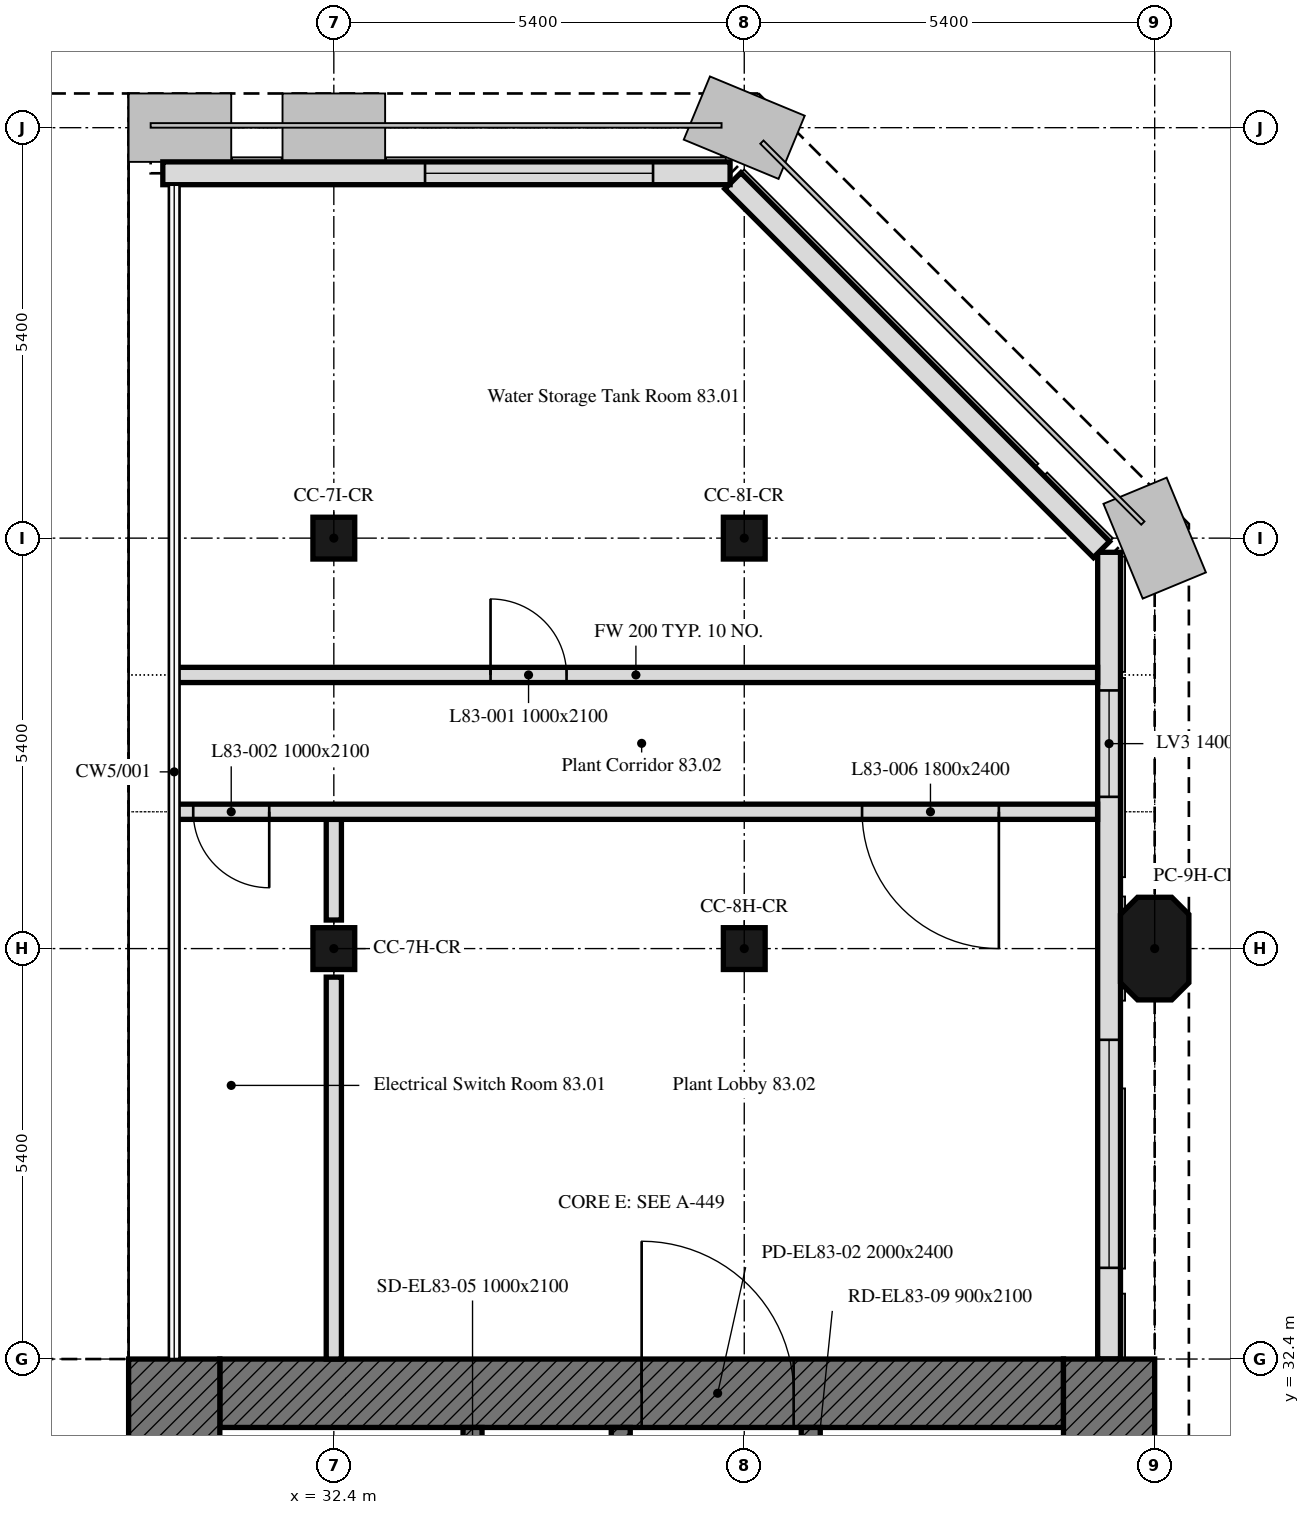
"""IFC4 building model, lengths in metres.
Left out: names, types, materials, properties, quantities, classifications, styles, units other than length and angle.
Written with IfcOpenShell. Run it as: python <this file> out.ifc"""

import sys

from ifc_helpers import new_model, si_unit, direction, frame, frame_2d, origin, origin_2d, place, context, subcontext, project, spatial, polyline, rectangle, outline, extrude, element, fill, save


model = new_model("IFC4")
c1 = context("Model", 3, precision=1e-05, world=origin(), true_north=direction((0.0, 1.0)))
c2 = subcontext(c1, "Body", "Model", "MODEL_VIEW")
j1 = project(units=[si_unit("LENGTHUNIT", "METRE"), si_unit("PLANEANGLEUNIT", "RADIAN")], contexts=[c1])
p1 = place(None, origin())
s1 = spatial("IfcSite", under=j1, at=p1, CompositionType="ELEMENT")
p2 = place(p1, origin())
s2 = spatial("IfcBuilding", under=s1, at=p2, CompositionType="ELEMENT")
p3 = place(p2, frame((0.0, 0.0, 335.2)))
s3 = spatial("IfcBuildingStorey", under=s2, at=p3, CompositionType="ELEMENT", Elevation=335.2)
for number, where, z_axis, x_axis in (
    (1, (32.4, 37.8, 0.0), (0.0, 0.0, 1.0), (1.0, 0.0, 0.0)),
    (2, (37.8, 37.8, 0.0), (0.0, 0.0, 1.0), (1.0, 0.0, 0.0)),
):
    element("IfcColumn", number, at=place(p3, frame(where, z_axis=z_axis, x_axis=x_axis)), inside=s3, PredefinedType="COLUMN", context=c2, shape_type="SweptSolid", body=[
        extrude(rectangle(XDim=0.55, YDim=0.55, at=origin_2d()), origin(), (0.0, 0.0, 1.0), 2.7),
    ])
p4 = place(p3, frame((43.2, 37.8, 0.0), z_axis=(0.0, 0.0, 1.0), x_axis=(0.0, 1.0, 0.0)))
e3 = element("IfcColumn", 3, at=p4, inside=s3, PredefinedType="COLUMN", context=c2, shape_type="SweptSolid", body=[
    extrude(outline(polyline([(-0.45, -0.45), (0.45, -0.45), (0.675, -0.225), (0.675, 0.225), (0.45, 0.45), (-0.45, 0.45), (-0.675, 0.225), (-0.675, -0.225), (-0.45, -0.45)])), origin(), (0.0, 0.0, 1.0), 2.7),
])
for number, where, z_axis, x_axis in (
    (4, (32.4, 43.2, 0.0), (0.0, 0.0, 1.0), (1.0, 0.0, 0.0)),
    (5, (37.8, 43.2, 0.0), (0.0, 0.0, 1.0), (1.0, 0.0, 0.0)),
):
    element("IfcColumn", number, at=place(p3, frame(where, z_axis=z_axis, x_axis=x_axis)), inside=s3, PredefinedType="COLUMN", context=c2, shape_type="SweptSolid", body=[
        extrude(rectangle(XDim=0.55, YDim=0.55, at=origin_2d()), origin(), (0.0, 0.0, 1.0), 2.7),
    ])
p5 = place(p3, frame((42.6, 32.4, 0.0), z_axis=(0.0, 0.0, 1.0), x_axis=(0.0, 1.0, 0.0)))
e6 = element("IfcWall", 6, at=p5, inside=s3, PredefinedType="SOLIDWALL", context=c2, shape_type="SweptSolid", body=[
    extrude(outline(polyline([(0.0, 0.0), (10.614, 0.0), (10.614, 8.433), (10.024, 8.433), (9.434, 8.433), (8.845, 8.433), (8.255, 8.433), (7.665, 8.433), (7.076, 8.433), (6.486, 8.433), (5.896, 8.433), (5.307, 8.433), (4.717, 8.433), (4.127, 8.433), (3.538, 8.433), (2.948, 8.433), (2.359, 8.433), (1.769, 8.433), (1.179, 8.433), (0.59, 8.433), (0.0, 8.433), (0.0, 0.0)])), frame((0.0, 0.15, 0.0), z_axis=(0.0, -1.0, 0.0), x_axis=(1.0, 0.0, 0.0)), (0.0, 0.0, 1.0), 0.3),
])
p6 = place(p5, frame((1.2, 0.0, 0.6)))
e7 = element("IfcOpeningElement", 7, at=p6, cuts=e6, PredefinedType="OPENING", context=c2, shape_type="SweptSolid", body=[
    extrude(rectangle(XDim=3.0, YDim=1.8, at=frame_2d((1.5, 0.9))), frame((0.0, 0.16, 0.0), z_axis=(0.0, -1.0, 0.0), x_axis=(1.0, 0.0, 0.0)), (0.0, 0.0, 1.0), 0.32),
])
p7 = place(p5, frame((7.396, 0.0, 0.6)))
e8 = element("IfcOpeningElement", 8, at=p7, cuts=e6, PredefinedType="OPENING", context=c2, shape_type="SweptSolid", body=[
    extrude(rectangle(XDim=1.4, YDim=1.8, at=frame_2d((0.7, 0.9))), frame((0.0, 0.16, 0.0), z_axis=(0.0, -1.0, 0.0), x_axis=(1.0, 0.0, 0.0)), (0.0, 0.0, 1.0), 0.32),
])
p8 = place(p3, frame((42.501, 43.051, 0.0), z_axis=(0.0, 0.0, 1.0), x_axis=(-0.707106781187, 0.707106781187, 0.0)))
e9 = element("IfcWall", 9, at=p8, inside=s3, PredefinedType="SOLIDWALL", context=c2, shape_type="SweptSolid", body=[
    extrude(outline(polyline([(0.0, 0.0), (6.86, 0.0), (6.86, 6.234), (6.288, 6.413), (5.716, 6.593), (5.145, 6.772), (4.573, 6.952), (4.001, 7.132), (3.43, 7.312), (2.858, 7.491), (2.287, 7.671), (1.715, 7.85), (1.143, 8.03), (0.572, 8.21), (0.0, 8.389), (0.0, 0.0)])), frame((0.0, 0.15, 0.0), z_axis=(0.0, -1.0, 0.0), x_axis=(1.0, 0.0, 0.0)), (0.0, 0.0, 1.0), 0.3),
])
p9 = place(p3, frame((37.614, 48.0, 0.0), z_axis=(0.0, 0.0, 1.0), x_axis=(-1.0, 0.0, 0.0)))
e10 = element("IfcWall", 10, at=p9, inside=s3, PredefinedType="SOLIDWALL", context=c2, shape_type="SweptSolid", body=[
    extrude(outline(polyline([(0.0, 0.0), (7.464, 0.0), (7.464, 2.9), (6.889, 3.155), (6.315, 3.41), (5.741, 3.666), (5.167, 3.921), (4.593, 4.176), (4.019, 4.431), (3.445, 4.686), (2.871, 4.941), (2.296, 5.197), (1.722, 5.452), (1.148, 5.707), (0.574, 5.962), (0.0, 6.217), (0.0, 0.0)])), frame((0.0, 0.15, 0.0), z_axis=(0.0, -1.0, 0.0), x_axis=(1.0, 0.0, 0.0)), (0.0, 0.0, 1.0), 0.3),
])
p10 = place(p9, frame((1.014, 0.0, 0.6)))
e11 = element("IfcOpeningElement", 11, at=p10, cuts=e10, PredefinedType="OPENING", context=c2, shape_type="SweptSolid", body=[
    extrude(rectangle(XDim=3.0, YDim=1.8, at=frame_2d((1.5, 0.9))), frame((0.0, 0.16, 0.0), z_axis=(0.0, -1.0, 0.0), x_axis=(1.0, 0.0, 0.0)), (0.0, 0.0, 1.0), 0.32),
])
p11 = place(p3, frame((30.9, 31.95, 0.0), z_axis=(0.0, 0.0, 1.0), x_axis=(1.0, 0.0, 0.0)))
e12 = element("IfcWall", 12, at=p11, inside=s3, PredefinedType="SOLIDWALL", context=c2, shape_type="SweptSolid", body=[
    extrude(outline(polyline([(0.0, 0.0), (11.1, 0.0), (11.1, 8.167), (0.0, 3.233), (0.0, 0.0)])), frame((0.0, 0.45, 0.0), z_axis=(0.0, -1.0, 0.0), x_axis=(1.0, 0.0, 0.0)), (0.0, 0.0, 1.0), 0.9),
])
p12 = place(p11, frame((5.55, 0.0, 0.0)))
e13 = element("IfcOpeningElement", 13, at=p12, cuts=e12, PredefinedType="OPENING", context=c2, shape_type="SweptSolid", body=[
    extrude(rectangle(XDim=2.0, YDim=2.4, at=frame_2d((1.0, 1.2))), frame((0.0, 0.45, 0.0), z_axis=(0.0, -1.0, 0.0), x_axis=(1.0, 0.0, 0.0)), (0.0, 0.0, 1.0), 0.9),
])
p13 = place(p3, frame((42.6, 32.4, 0.0), z_axis=(0.0, 0.0, 1.0), x_axis=(0.0, -1.0, 0.0)))
e14 = element("IfcWall", 14, at=p13, inside=s3, PredefinedType="SOLIDWALL", context=c2, shape_type="SweptSolid", body=[
    extrude(rectangle(XDim=16.2, YDim=1.2, at=frame_2d((8.1, 0.0))), origin(), (0.0, 0.0, 1.0), 8.433),
])
p14 = place(p3, frame((30.3, 16.2, 0.0), z_axis=(0.0, 0.0, 1.0), x_axis=(0.0, 1.0, 0.0)))
e15 = element("IfcWall", 15, at=p14, inside=s3, PredefinedType="SOLIDWALL", context=c2, shape_type="SweptSolid", body=[
    extrude(rectangle(XDim=16.2, YDim=1.2, at=frame_2d((8.1, 0.0))), origin(), (0.0, 0.0, 1.0), 2.967),
])
p15 = place(p3, frame((38.675, 17.1, 0.0), z_axis=(0.0, 0.0, 1.0), x_axis=(0.0, 1.0, 0.0)))
e16 = element("IfcWall", 16, at=p15, inside=s3, PredefinedType="SOLIDWALL", context=c2, shape_type="SweptSolid", body=[
    extrude(rectangle(XDim=14.4, YDim=0.25, at=frame_2d((7.2, 0.0))), origin(), (0.0, 0.0, 1.0), 6.689),
])
p16 = place(p15, frame((4.6, 0.0, 0.0)))
e17 = element("IfcOpeningElement", 17, at=p16, cuts=e16, PredefinedType="OPENING", context=c2, shape_type="SweptSolid", body=[
    extrude(rectangle(XDim=1.0, YDim=2.1, at=frame_2d((0.5, 1.05))), frame((0.0, 0.125, 0.0), z_axis=(0.0, -1.0, 0.0), x_axis=(1.0, 0.0, 0.0)), (0.0, 0.0, 1.0), 0.25),
])
p17 = place(p15, frame((7.062, 0.0, 0.0)))
e18 = element("IfcOpeningElement", 18, at=p17, cuts=e16, PredefinedType="OPENING", context=c2, shape_type="SweptSolid", body=[
    extrude(rectangle(XDim=1.2, YDim=2.1, at=frame_2d((0.6, 1.05))), frame((0.0, 0.125, 0.0), z_axis=(0.0, -1.0, 0.0), x_axis=(1.0, 0.0, 0.0)), (0.0, 0.0, 1.0), 0.25),
])
p18 = place(p15, frame((10.106, 0.0, 0.0)))
e19 = element("IfcOpeningElement", 19, at=p18, cuts=e16, PredefinedType="OPENING", context=c2, shape_type="SweptSolid", body=[
    extrude(rectangle(XDim=0.9, YDim=2.1, at=frame_2d((0.45, 1.05))), frame((0.0, 0.125, 0.0), z_axis=(0.0, -1.0, 0.0), x_axis=(1.0, 0.0, 0.0)), (0.0, 0.0, 1.0), 0.25),
])
p19 = place(p15, frame((12.719, 0.0, 0.0)))
e20 = element("IfcOpeningElement", 20, at=p19, cuts=e16, PredefinedType="OPENING", context=c2, shape_type="SweptSolid", body=[
    extrude(rectangle(XDim=0.9, YDim=2.1, at=frame_2d((0.45, 1.05))), frame((0.0, 0.125, 0.0), z_axis=(0.0, -1.0, 0.0), x_axis=(1.0, 0.0, 0.0)), (0.0, 0.0, 1.0), 0.25),
])
p20 = place(p3, frame((34.225, 17.1, 0.0), z_axis=(0.0, 0.0, 1.0), x_axis=(0.0, 1.0, 0.0)))
e21 = element("IfcWall", 21, at=p20, inside=s3, PredefinedType="SOLIDWALL", context=c2, shape_type="SweptSolid", body=[
    extrude(rectangle(XDim=14.4, YDim=0.25, at=frame_2d((7.2, 0.0))), origin(), (0.0, 0.0, 1.0), 4.711),
])
p21 = place(p20, frame((13.15, 0.0, 0.0)))
e22 = element("IfcOpeningElement", 22, at=p21, cuts=e21, PredefinedType="OPENING", context=c2, shape_type="SweptSolid", body=[
    extrude(rectangle(XDim=1.0, YDim=2.1, at=frame_2d((0.5, 1.05))), frame((0.0, 0.125, 0.0), z_axis=(0.0, -1.0, 0.0), x_axis=(1.0, 0.0, 0.0)), (0.0, 0.0, 1.0), 0.25),
])
p22 = place(p20, frame((0.24, 0.0, 0.0)))
e23 = element("IfcOpeningElement", 23, at=p22, cuts=e21, PredefinedType="OPENING", context=c2, shape_type="SweptSolid", body=[
    extrude(rectangle(XDim=0.9, YDim=2.1, at=frame_2d((0.45, 1.05))), frame((0.0, 0.125, 0.0), z_axis=(0.0, -1.0, 0.0), x_axis=(1.0, 0.0, 0.0)), (0.0, 0.0, 1.0), 0.25),
])
p23 = place(p20, frame((2.74, 0.0, 0.0)))
e24 = element("IfcOpeningElement", 24, at=p23, cuts=e21, PredefinedType="OPENING", context=c2, shape_type="SweptSolid", body=[
    extrude(rectangle(XDim=0.9, YDim=2.1, at=frame_2d((0.45, 1.05))), frame((0.0, 0.125, 0.0), z_axis=(0.0, -1.0, 0.0), x_axis=(1.0, 0.0, 0.0)), (0.0, 0.0, 1.0), 0.25),
])
p24 = place(p20, frame((6.175, 0.0, 0.0)))
e25 = element("IfcOpeningElement", 25, at=p24, cuts=e21, PredefinedType="OPENING", context=c2, shape_type="SweptSolid", body=[
    extrude(rectangle(XDim=0.9, YDim=2.1, at=frame_2d((0.45, 1.05))), frame((0.0, 0.125, 0.0), z_axis=(0.0, -1.0, 0.0), x_axis=(1.0, 0.0, 0.0)), (0.0, 0.0, 1.0), 0.25),
])
p25 = place(p3, frame((36.175, 29.4, 0.0), z_axis=(0.0, 0.0, 1.0), x_axis=(0.0, 1.0, 0.0)))
e26 = element("IfcWall", 26, at=p25, inside=s3, PredefinedType="SOLIDWALL", context=c2, shape_type="SweptSolid", body=[
    extrude(rectangle(XDim=2.1, YDim=0.25, at=frame_2d((1.05, 0.0))), origin(), (0.0, 0.0, 1.0), 5.578),
])
p26 = place(p25, frame((0.5, 0.0, 0.0)))
e27 = element("IfcOpeningElement", 27, at=p26, cuts=e26, PredefinedType="OPENING", context=c2, shape_type="SweptSolid", body=[
    extrude(rectangle(XDim=1.0, YDim=2.1, at=frame_2d((0.5, 1.05))), frame((0.0, 0.125, 0.0), z_axis=(0.0, -1.0, 0.0), x_axis=(1.0, 0.0, 0.0)), (0.0, 0.0, 1.0), 0.25),
])
p27 = place(p3, frame((30.3, 41.4, 0.0), z_axis=(0.0, 0.0, 1.0), x_axis=(1.0, 0.0, 0.0)))
e28 = element("IfcWall", 28, at=p27, inside=s3, PredefinedType="PARTITIONING", context=c2, shape_type="SweptSolid", body=[
    extrude(outline(polyline([(0.0, 0.0), (12.149, 0.0), (12.149, 8.366), (0.0, 2.967), (0.0, 0.0)])), frame((0.0, 0.1, 0.0), z_axis=(0.0, -1.0, 0.0), x_axis=(1.0, 0.0, 0.0)), (0.0, 0.0, 1.0), 0.2),
])
p28 = place(p27, frame((4.162, 0.0, 0.0)))
e29 = element("IfcOpeningElement", 29, at=p28, cuts=e28, PredefinedType="OPENING", context=c2, shape_type="SweptSolid", body=[
    extrude(rectangle(XDim=1.0, YDim=2.1, at=frame_2d((0.5, 1.05))), frame((0.0, 0.1, 0.0), z_axis=(0.0, -1.0, 0.0), x_axis=(1.0, 0.0, 0.0)), (0.0, 0.0, 1.0), 0.2),
])
p29 = place(p3, frame((32.4, 32.4, 0.0), z_axis=(0.0, 0.0, 1.0), x_axis=(0.0, 1.0, 0.0)))
e30 = element("IfcWall", 30, at=p29, inside=s3, PredefinedType="PARTITIONING", context=c2, shape_type="SweptSolid", body=[
    extrude(rectangle(XDim=5.024, YDim=0.2, at=frame_2d((2.512, 0.0))), origin(), (0.0, 0.0, 1.0), 3.9),
])
p30 = place(p3, frame((32.4, 38.176, 0.0), z_axis=(0.0, 0.0, 1.0), x_axis=(0.0, 1.0, 0.0)))
e31 = element("IfcWall", 31, at=p30, inside=s3, PredefinedType="PARTITIONING", context=c2, shape_type="SweptSolid", body=[
    extrude(rectangle(XDim=1.324, YDim=0.2, at=frame_2d((0.662, 0.0))), origin(), (0.0, 0.0, 1.0), 3.9),
])
p31 = place(p3, frame((42.449, 39.6, 0.0), z_axis=(0.0, 0.0, 1.0), x_axis=(-1.0, 0.0, 0.0)))
e32 = element("IfcWall", 32, at=p31, inside=s3, PredefinedType="PARTITIONING", context=c2, shape_type="SweptSolid", body=[
    extrude(outline(polyline([(0.0, 0.0), (12.149, 0.0), (12.149, 2.967), (0.0, 8.366), (0.0, 0.0)])), frame((0.0, 0.1, 0.0), z_axis=(0.0, -1.0, 0.0), x_axis=(1.0, 0.0, 0.0)), (0.0, 0.0, 1.0), 0.2),
])
p32 = place(p31, frame((10.899, 0.0, 0.0)))
e33 = element("IfcOpeningElement", 33, at=p32, cuts=e32, PredefinedType="OPENING", context=c2, shape_type="SweptSolid", body=[
    extrude(rectangle(XDim=1.0, YDim=2.1, at=frame_2d((0.5, 1.05))), frame((0.0, 0.1, 0.0), z_axis=(0.0, -1.0, 0.0), x_axis=(1.0, 0.0, 0.0)), (0.0, 0.0, 1.0), 0.2),
])
p33 = place(p31, frame((1.299, 0.0, 0.0)))
e34 = element("IfcOpeningElement", 34, at=p33, cuts=e32, PredefinedType="OPENING", context=c2, shape_type="SweptSolid", body=[
    extrude(rectangle(XDim=1.8, YDim=2.4, at=frame_2d((0.9, 1.2))), frame((0.0, 0.1, 0.0), z_axis=(0.0, -1.0, 0.0), x_axis=(1.0, 0.0, 0.0)), (0.0, 0.0, 1.0), 0.2),
])
p34 = place(p6, origin())
e35 = element("IfcWindow", 35, at=p34, inside=s3, PartitioningType="SINGLE_PANEL", PredefinedType="WINDOW", context=c2, shape_type="SweptSolid", body=[
    extrude(rectangle(XDim=3.0, YDim=1.8, at=frame_2d((1.5, 0.9))), frame((0.0, 0.03, 0.0), z_axis=(0.0, -1.0, 0.0), x_axis=(1.0, 0.0, 0.0)), (0.0, 0.0, 1.0), 0.06),
])
fill(e7, e35)
p35 = place(p7, origin())
e36 = element("IfcWindow", 36, at=p35, inside=s3, PartitioningType="SINGLE_PANEL", PredefinedType="WINDOW", context=c2, shape_type="SweptSolid", body=[
    extrude(rectangle(XDim=1.4, YDim=1.8, at=frame_2d((0.7, 0.9))), frame((0.0, 0.03, 0.0), z_axis=(0.0, -1.0, 0.0), x_axis=(1.0, 0.0, 0.0)), (0.0, 0.0, 1.0), 0.06),
])
fill(e8, e36)
p36 = place(p10, origin())
e37 = element("IfcWindow", 37, at=p36, inside=s3, PartitioningType="SINGLE_PANEL", PredefinedType="WINDOW", context=c2, shape_type="SweptSolid", body=[
    extrude(rectangle(XDim=3.0, YDim=1.8, at=frame_2d((1.5, 0.9))), frame((0.0, 0.03, 0.0), z_axis=(0.0, -1.0, 0.0), x_axis=(1.0, 0.0, 0.0)), (0.0, 0.0, 1.0), 0.06),
])
fill(e11, e37)
p37 = place(p12, origin())
e38 = element("IfcDoor", 38, at=p37, inside=s3, OperationType="DOUBLE_DOOR_SINGLE_SWING", PredefinedType="DOOR", context=c2, shape_type="SweptSolid", body=[
    extrude(rectangle(XDim=2.0, YDim=2.4, at=frame_2d((1.0, 1.2))), frame((0.0, 0.025, 0.0), z_axis=(0.0, -1.0, 0.0), x_axis=(1.0, 0.0, 0.0)), (0.0, 0.0, 1.0), 0.05),
])
fill(e13, e38)
p38 = place(p28, origin())
e39 = element("IfcDoor", 39, at=p38, inside=s3, OperationType="SINGLE_SWING_LEFT", PredefinedType="DOOR", context=c2, shape_type="SweptSolid", body=[
    extrude(rectangle(XDim=1.0, YDim=2.1, at=frame_2d((0.5, 1.05))), frame((0.0, 0.025, 0.0), z_axis=(0.0, -1.0, 0.0), x_axis=(1.0, 0.0, 0.0)), (0.0, 0.0, 1.0), 0.05),
])
fill(e29, e39)
p39 = place(p32, origin())
e40 = element("IfcDoor", 40, at=p39, inside=s3, OperationType="SINGLE_SWING_LEFT", PredefinedType="DOOR", context=c2, shape_type="SweptSolid", body=[
    extrude(rectangle(XDim=1.0, YDim=2.1, at=frame_2d((0.5, 1.05))), frame((0.0, 0.025, 0.0), z_axis=(0.0, -1.0, 0.0), x_axis=(1.0, 0.0, 0.0)), (0.0, 0.0, 1.0), 0.05),
])
fill(e33, e40)
p40 = place(p33, origin())
e41 = element("IfcDoor", 41, at=p40, inside=s3, OperationType="DOUBLE_DOOR_SINGLE_SWING", PredefinedType="DOOR", context=c2, shape_type="SweptSolid", body=[
    extrude(rectangle(XDim=1.8, YDim=2.4, at=frame_2d((0.9, 1.2))), frame((0.0, 0.025, 0.0), z_axis=(0.0, -1.0, 0.0), x_axis=(1.0, 0.0, 0.0)), (0.0, 0.0, 1.0), 0.05),
])
fill(e34, e41)
save(model, sys.argv[1])
